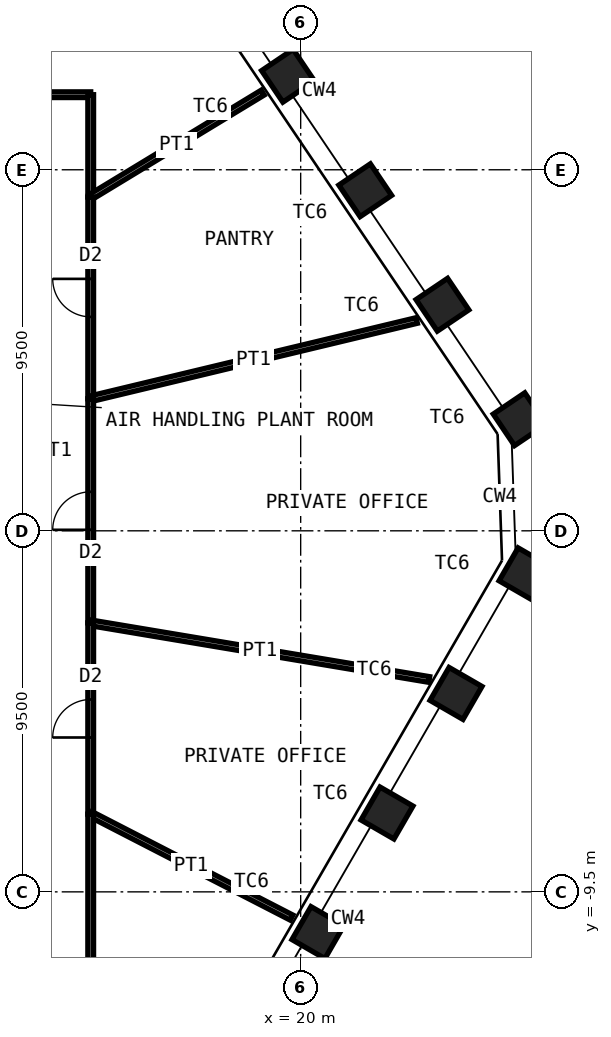
"""IFC4 building model, lengths in metres.
Left out: names, types, materials, properties, quantities, classifications, styles, units other than length and angle.
Written with IfcOpenShell. Run it as: python <this file> out.ifc"""

import sys

from ifc_helpers import new_model, si_unit, direction, frame, frame_2d, origin, origin_2d, place, context, subcontext, project, spatial, rectangle, hollow_rectangle, extrude, element, fill, save


model = new_model("IFC4")
c1 = context("Model", 3, precision=1e-05, world=origin(), true_north=direction((0.0, 1.0)))
c2 = subcontext(c1, "Body", "Model", "MODEL_VIEW")
j1 = project(units=[si_unit("LENGTHUNIT", "METRE"), si_unit("PLANEANGLEUNIT", "RADIAN")], contexts=[c1])
p1 = place(None, origin())
s1 = spatial("IfcSite", under=j1, at=p1, CompositionType="ELEMENT")
p2 = place(p1, origin())
s2 = spatial("IfcBuilding", under=s1, at=p2, CompositionType="ELEMENT")
p3 = place(p2, frame((0.0, 0.0, 226.6)))
s3 = spatial("IfcBuildingStorey", under=s2, at=p3, CompositionType="ELEMENT", Elevation=226.6)
for number, where, z_axis, x_axis in (
    (1, (19.667, 11.973, 0.0), (0.0, 0.0, 1.0), (-0.559, 0.829, 0.0)),
    (2, (21.699, 8.961, 0.0), (0.0, 0.0, 1.0), (-0.559, 0.829, 0.0)),
    (3, (23.731, 5.948, 0.0), (0.0, 0.0, 1.0), (-0.559, 0.829, 0.0)),
    (4, (25.762, 2.936, 0.0), (0.0, 0.0, 1.0), (-0.559, 0.829, 0.0)),
    (5, (25.905, -1.132, 0.0), (0.0, 0.0, 1.0), (0.5, 0.866, 0.0)),
    (6, (24.088, -4.279, 0.0), (0.0, 0.0, 1.0), (0.5, 0.866, 0.0)),
    (7, (22.271, -7.426, 0.0), (0.0, 0.0, 1.0), (0.5, 0.866, 0.0)),
    (8, (20.454, -10.572, 0.0), (0.0, 0.0, 1.0), (0.5, 0.866, 0.0)),
):
    element("IfcColumn", number, at=place(p3, frame(where, z_axis=z_axis, x_axis=x_axis)), inside=s3, PredefinedType="COLUMN", context=c2, shape_type="SweptSolid", body=[
        extrude(hollow_rectangle(XDim=1.0, YDim=1.0, WallThickness=0.06, at=origin_2d()), origin(), (0.0, 0.0, 1.0), 4.2),
    ])
p4 = place(p3, frame((-0.551, 11.475, 0.0), z_axis=(0.0, 0.0, 1.0), x_axis=(1.0, 0.0, 0.0)))
e9 = element("IfcWall", 9, at=p4, inside=s3, PredefinedType="PARTITIONING", context=c2, shape_type="SweptSolid", body=[
    extrude(rectangle(XDim=15.026, YDim=0.15, at=frame_2d((7.513, 0.0))), origin(), (0.0, 0.0, 1.0), 4.03),
])
p5 = place(p4, frame((6.613, 0.0, 0.0)))
e10 = element("IfcOpeningElement", 10, at=p5, cuts=e9, PredefinedType="OPENING", context=c2, shape_type="SweptSolid", body=[
    extrude(rectangle(XDim=1.8, YDim=2.4, at=frame_2d((0.9, 1.2))), frame((0.0, 0.085, 0.0), z_axis=(0.0, -1.0, 0.0), x_axis=(1.0, 0.0, 0.0)), (0.0, 0.0, 1.0), 0.17),
])
p6 = place(p3, frame((14.475, 11.475, 0.0), z_axis=(0.0, 0.0, 1.0), x_axis=(0.0, -1.0, 0.0)))
e11 = element("IfcWall", 11, at=p6, inside=s3, PredefinedType="PARTITIONING", context=c2, shape_type="SweptSolid", body=[
    extrude(rectangle(XDim=2.692, YDim=0.15, at=frame_2d((1.346, 0.0))), origin(), (0.0, 0.0, 1.0), 4.03),
])
p7 = place(p3, frame((19.001, 11.53, 0.0), z_axis=(0.0, 0.0, 1.0), x_axis=(-0.854906581035, -0.518781975114, 0.0)))
e12 = element("IfcWall", 12, at=p7, inside=s3, PredefinedType="PARTITIONING", context=c2, shape_type="SweptSolid", body=[
    extrude(rectangle(XDim=5.294, YDim=0.15, at=frame_2d((2.647, 0.0))), origin(), (0.0, 0.0, 1.0), 3.43),
])
p8 = place(p3, frame((14.475, 8.783, 0.0), z_axis=(0.0, 0.0, 1.0), x_axis=(0.0, -1.0, 0.0)))
e13 = element("IfcWall", 13, at=p8, inside=s3, PredefinedType="PARTITIONING", context=c2, shape_type="SweptSolid", body=[
    extrude(rectangle(XDim=5.309, YDim=0.15, at=frame_2d((2.654, 0.0))), origin(), (0.0, 0.0, 1.0), 4.03),
])
p9 = place(p8, frame((2.154, 0.0, 0.0)))
e14 = element("IfcOpeningElement", 14, at=p9, cuts=e13, PredefinedType="OPENING", context=c2, shape_type="SweptSolid", body=[
    extrude(rectangle(XDim=1.0, YDim=2.4, at=frame_2d((0.5, 1.2))), frame((0.0, 0.085, 0.0), z_axis=(0.0, -1.0, 0.0), x_axis=(1.0, 0.0, 0.0)), (0.0, 0.0, 1.0), 0.17),
])
p10 = place(p3, frame((23.053, 5.534, 0.0), z_axis=(0.0, 0.0, 1.0), x_axis=(-0.972377252501, -0.233414821335, 0.0)))
e15 = element("IfcWall", 15, at=p10, inside=s3, PredefinedType="PARTITIONING", context=c2, shape_type="SweptSolid", body=[
    extrude(rectangle(XDim=8.822, YDim=0.15, at=frame_2d((4.411, 0.0))), origin(), (0.0, 0.0, 1.0), 3.43),
])
p11 = place(p3, frame((14.475, 3.475, 0.0), z_axis=(0.0, 0.0, 1.0), x_axis=(0.0, -1.0, 0.0)))
e16 = element("IfcWall", 16, at=p11, inside=s3, PredefinedType="PARTITIONING", context=c2, shape_type="SweptSolid", body=[
    extrude(rectangle(XDim=5.896, YDim=0.15, at=frame_2d((2.948, 0.0))), origin(), (0.0, 0.0, 1.0), 4.03),
])
p12 = place(p11, frame((2.448, 0.0, 0.0)))
e17 = element("IfcOpeningElement", 17, at=p12, cuts=e16, PredefinedType="OPENING", context=c2, shape_type="SweptSolid", body=[
    extrude(rectangle(XDim=1.0, YDim=2.4, at=frame_2d((0.5, 1.2))), frame((0.0, 0.085, 0.0), z_axis=(0.0, -1.0, 0.0), x_axis=(1.0, 0.0, 0.0)), (0.0, 0.0, 1.0), 0.17),
])
p13 = place(p3, frame((23.383, -3.912, 0.0), z_axis=(0.0, 0.0, 1.0), x_axis=(-0.986293651891, 0.164999491631, 0.0)))
e18 = element("IfcWall", 18, at=p13, inside=s3, PredefinedType="PARTITIONING", context=c2, shape_type="SweptSolid", body=[
    extrude(rectangle(XDim=9.032, YDim=0.15, at=frame_2d((4.516, 0.0))), origin(), (0.0, 0.0, 1.0), 3.43),
])
p14 = place(p3, frame((14.475, -2.422, 0.0), z_axis=(0.0, 0.0, 1.0), x_axis=(0.0, -1.0, 0.0)))
e19 = element("IfcWall", 19, at=p14, inside=s3, PredefinedType="PARTITIONING", context=c2, shape_type="SweptSolid", body=[
    extrude(rectangle(XDim=5.033, YDim=0.15, at=frame_2d((2.517, 0.0))), origin(), (0.0, 0.0, 1.0), 4.03),
])
p15 = place(p14, frame((2.017, 0.0, 0.0)))
e20 = element("IfcOpeningElement", 20, at=p15, cuts=e19, PredefinedType="OPENING", context=c2, shape_type="SweptSolid", body=[
    extrude(rectangle(XDim=1.0, YDim=2.4, at=frame_2d((0.5, 1.2))), frame((0.0, 0.085, 0.0), z_axis=(0.0, -1.0, 0.0), x_axis=(1.0, 0.0, 0.0)), (0.0, 0.0, 1.0), 0.17),
])
p16 = place(p3, frame((19.759, -10.177, 0.0), z_axis=(0.0, 0.0, 1.0), x_axis=(-0.889015092721, 0.457877893017, 0.0)))
e21 = element("IfcWall", 21, at=p16, inside=s3, PredefinedType="PARTITIONING", context=c2, shape_type="SweptSolid", body=[
    extrude(rectangle(XDim=5.944, YDim=0.15, at=frame_2d((2.972, 0.0))), origin(), (0.0, 0.0, 1.0), 3.43),
])
p17 = place(p3, frame((14.475, -7.455, 0.0), z_axis=(0.0, 0.0, 1.0), x_axis=(0.0, -1.0, 0.0)))
e22 = element("IfcWall", 22, at=p17, inside=s3, PredefinedType="PARTITIONING", context=c2, shape_type="SweptSolid", body=[
    extrude(rectangle(XDim=4.02, YDim=0.15, at=frame_2d((2.01, 0.0))), origin(), (0.0, 0.0, 1.0), 4.03),
])
p18 = place(p9, origin())
e23 = element("IfcDoor", 23, at=p18, inside=s3, OperationType="SINGLE_SWING_LEFT", PredefinedType="DOOR", context=c2, shape_type="SweptSolid", body=[
    extrude(rectangle(XDim=1.0, YDim=2.4, at=frame_2d((0.5, 1.2))), frame((0.0, 0.025, 0.0), z_axis=(0.0, -1.0, 0.0), x_axis=(1.0, 0.0, 0.0)), (0.0, 0.0, 1.0), 0.05),
])
fill(e14, e23)
p19 = place(p12, origin())
e24 = element("IfcDoor", 24, at=p19, inside=s3, OperationType="SINGLE_SWING_RIGHT", PredefinedType="DOOR", context=c2, shape_type="SweptSolid", body=[
    extrude(rectangle(XDim=1.0, YDim=2.4, at=frame_2d((0.5, 1.2))), frame((0.0, 0.025, 0.0), z_axis=(0.0, -1.0, 0.0), x_axis=(1.0, 0.0, 0.0)), (0.0, 0.0, 1.0), 0.05),
])
fill(e17, e24)
p20 = place(p15, origin())
e25 = element("IfcDoor", 25, at=p20, inside=s3, OperationType="SINGLE_SWING_RIGHT", PredefinedType="DOOR", context=c2, shape_type="SweptSolid", body=[
    extrude(rectangle(XDim=1.0, YDim=2.4, at=frame_2d((0.5, 1.2))), frame((0.0, 0.025, 0.0), z_axis=(0.0, -1.0, 0.0), x_axis=(1.0, 0.0, 0.0)), (0.0, 0.0, 1.0), 0.05),
])
fill(e20, e25)
save(model, sys.argv[1])
